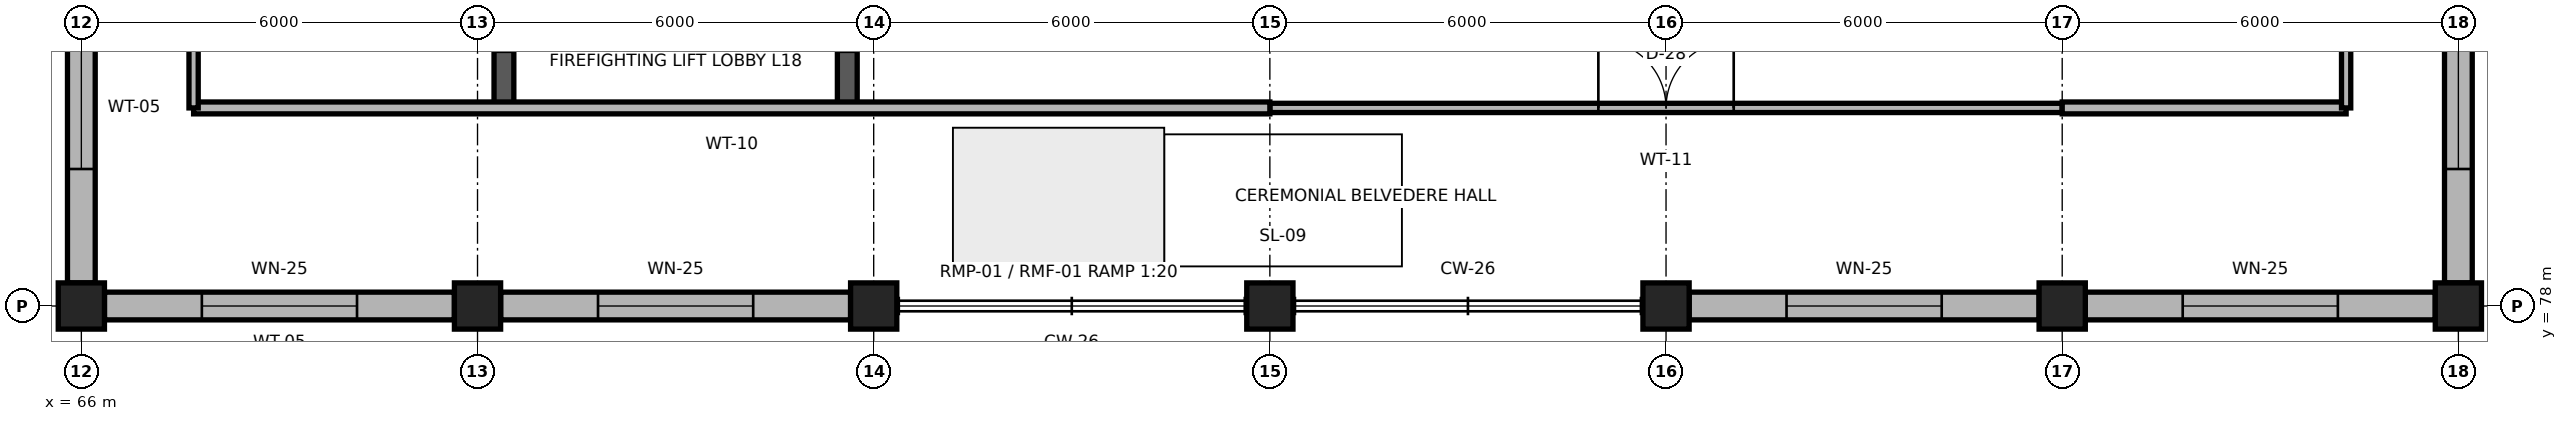
"""IFC4 building model, lengths in metres.
Left out: names, types, materials, properties, quantities, classifications, styles, units other than length and angle.
Written with IfcOpenShell. Run it as: python <this file> out.ifc"""

import sys

from ifc_helpers import new_model, si_unit, direction, frame, frame_2d, origin, origin_2d, place, context, subcontext, project, spatial, rectangle, extrude, element, fill, save


model = new_model("IFC4")
c1 = context("Model", 3, precision=1e-05, world=origin(), true_north=direction((0.0, 1.0)))
c2 = subcontext(c1, "Body", "Model", "MODEL_VIEW")
j1 = project(units=[si_unit("LENGTHUNIT", "METRE"), si_unit("PLANEANGLEUNIT", "RADIAN")], contexts=[c1])
p1 = place(None, origin())
s1 = spatial("IfcSite", under=j1, at=p1, CompositionType="ELEMENT")
p2 = place(p1, origin())
s2 = spatial("IfcBuilding", under=s1, at=p2, CompositionType="ELEMENT")
p3 = place(p2, frame((0.0, 0.0, 72.0)))
s3 = spatial("IfcBuildingStorey", under=s2, at=p3, CompositionType="ELEMENT", Elevation=72.0)
for number, where, z_axis, x_axis in (
    (1, (66.0, 78.0, 0.0), (0.0, 0.0, 1.0), (1.0, 0.0, 0.0)),
    (2, (72.0, 78.0, 0.0), (0.0, 0.0, 1.0), (1.0, 0.0, 0.0)),
    (3, (78.0, 78.0, 0.0), (0.0, 0.0, 1.0), (1.0, 0.0, 0.0)),
    (4, (84.0, 78.0, 0.0), (0.0, 0.0, 1.0), (1.0, 0.0, 0.0)),
    (5, (90.0, 78.0, 0.0), (0.0, 0.0, 1.0), (1.0, 0.0, 0.0)),
    (6, (96.0, 78.0, 0.0), (0.0, 0.0, 1.0), (1.0, 0.0, 0.0)),
    (7, (102.0, 78.0, 0.0), (0.0, 0.0, 1.0), (1.0, 0.0, 0.0)),
):
    element("IfcColumn", number, at=place(p3, frame(where, z_axis=z_axis, x_axis=x_axis)), inside=s3, PredefinedType="COLUMN", context=c2, shape_type="SweptSolid", body=[
        extrude(rectangle(XDim=0.7, YDim=0.7, at=origin_2d()), origin(), (0.0, 0.0, 1.0), 4.3),
    ])
p4 = place(p3, frame((66.35, 78.0, 0.0), z_axis=(0.0, 0.0, 1.0), x_axis=(1.0, 0.0, 0.0)))
e8 = element("IfcWall", 8, at=p4, inside=s3, PredefinedType="SOLIDWALL", context=c2, shape_type="SweptSolid", body=[
    extrude(rectangle(XDim=5.3, YDim=0.42, at=frame_2d((2.65, 0.0))), origin(), (0.0, 0.0, 1.0), 3.88),
])
p5 = place(p4, frame((1.475, 0.0, 0.85)))
e9 = element("IfcOpeningElement", 9, at=p5, cuts=e8, PredefinedType="OPENING", context=c2, shape_type="SweptSolid", body=[
    extrude(rectangle(XDim=2.35, YDim=2.65, at=frame_2d((1.175, 1.325))), frame((0.0, 0.225, 0.0), z_axis=(0.0, -1.0, 0.0), x_axis=(1.0, 0.0, 0.0)), (0.0, 0.0, 1.0), 0.45),
])
p6 = place(p3, frame((72.35, 78.0, 0.0), z_axis=(0.0, 0.0, 1.0), x_axis=(1.0, 0.0, 0.0)))
e10 = element("IfcWall", 10, at=p6, inside=s3, PredefinedType="SOLIDWALL", context=c2, shape_type="SweptSolid", body=[
    extrude(rectangle(XDim=5.3, YDim=0.42, at=frame_2d((2.65, 0.0))), origin(), (0.0, 0.0, 1.0), 3.88),
])
p7 = place(p6, frame((1.475, 0.0, 0.85)))
e11 = element("IfcOpeningElement", 11, at=p7, cuts=e10, PredefinedType="OPENING", context=c2, shape_type="SweptSolid", body=[
    extrude(rectangle(XDim=2.35, YDim=2.65, at=frame_2d((1.175, 1.325))), frame((0.0, 0.225, 0.0), z_axis=(0.0, -1.0, 0.0), x_axis=(1.0, 0.0, 0.0)), (0.0, 0.0, 1.0), 0.45),
])
p8 = place(p3, frame((90.35, 78.0, 0.0), z_axis=(0.0, 0.0, 1.0), x_axis=(1.0, 0.0, 0.0)))
e12 = element("IfcWall", 12, at=p8, inside=s3, PredefinedType="SOLIDWALL", context=c2, shape_type="SweptSolid", body=[
    extrude(rectangle(XDim=5.3, YDim=0.42, at=frame_2d((2.65, 0.0))), origin(), (0.0, 0.0, 1.0), 3.88),
])
p9 = place(p8, frame((1.475, 0.0, 0.85)))
e13 = element("IfcOpeningElement", 13, at=p9, cuts=e12, PredefinedType="OPENING", context=c2, shape_type="SweptSolid", body=[
    extrude(rectangle(XDim=2.35, YDim=2.65, at=frame_2d((1.175, 1.325))), frame((0.0, 0.225, 0.0), z_axis=(0.0, -1.0, 0.0), x_axis=(1.0, 0.0, 0.0)), (0.0, 0.0, 1.0), 0.45),
])
p10 = place(p3, frame((96.35, 78.0, 0.0), z_axis=(0.0, 0.0, 1.0), x_axis=(1.0, 0.0, 0.0)))
e14 = element("IfcWall", 14, at=p10, inside=s3, PredefinedType="SOLIDWALL", context=c2, shape_type="SweptSolid", body=[
    extrude(rectangle(XDim=5.3, YDim=0.42, at=frame_2d((2.65, 0.0))), origin(), (0.0, 0.0, 1.0), 3.88),
])
p11 = place(p10, frame((1.475, 0.0, 0.85)))
e15 = element("IfcOpeningElement", 15, at=p11, cuts=e14, PredefinedType="OPENING", context=c2, shape_type="SweptSolid", body=[
    extrude(rectangle(XDim=2.35, YDim=2.65, at=frame_2d((1.175, 1.325))), frame((0.0, 0.225, 0.0), z_axis=(0.0, -1.0, 0.0), x_axis=(1.0, 0.0, 0.0)), (0.0, 0.0, 1.0), 0.45),
])
p12 = place(p3, frame((66.0, 78.35, 0.0), z_axis=(0.0, 0.0, 1.0), x_axis=(0.0, 1.0, 0.0)))
e16 = element("IfcWall", 16, at=p12, inside=s3, PredefinedType="SOLIDWALL", context=c2, shape_type="SweptSolid", body=[
    extrude(rectangle(XDim=5.3, YDim=0.42, at=frame_2d((2.65, 0.0))), origin(), (0.0, 0.0, 1.0), 3.88),
])
p13 = place(p12, frame((1.725, 0.0, 0.85)))
e17 = element("IfcOpeningElement", 17, at=p13, cuts=e16, PredefinedType="OPENING", context=c2, shape_type="SweptSolid", body=[
    extrude(rectangle(XDim=1.85, YDim=2.55, at=frame_2d((0.925, 1.275))), frame((0.0, 0.225, 0.0), z_axis=(0.0, -1.0, 0.0), x_axis=(1.0, 0.0, 0.0)), (0.0, 0.0, 1.0), 0.45),
])
p14 = place(p3, frame((102.0, 78.35, 0.0), z_axis=(0.0, 0.0, 1.0), x_axis=(0.0, 1.0, 0.0)))
e18 = element("IfcWall", 18, at=p14, inside=s3, PredefinedType="SOLIDWALL", context=c2, shape_type="SweptSolid", body=[
    extrude(rectangle(XDim=5.3, YDim=0.42, at=frame_2d((2.65, 0.0))), origin(), (0.0, 0.0, 1.0), 3.88),
])
p15 = place(p14, frame((1.725, 0.0, 0.85)))
e19 = element("IfcOpeningElement", 19, at=p15, cuts=e18, PredefinedType="OPENING", context=c2, shape_type="SweptSolid", body=[
    extrude(rectangle(XDim=1.85, YDim=2.55, at=frame_2d((0.925, 1.275))), frame((0.0, 0.225, 0.0), z_axis=(0.0, -1.0, 0.0), x_axis=(1.0, 0.0, 0.0)), (0.0, 0.0, 1.0), 0.45),
])
p16 = place(p3, frame((72.4, 81.0, 0.0), z_axis=(0.0, 0.0, 1.0), x_axis=(0.0, 1.0, 0.0)))
e20 = element("IfcWall", 20, at=p16, inside=s3, PredefinedType="SHEAR", context=c2, shape_type="SweptSolid", body=[
    extrude(rectangle(XDim=3.0, YDim=0.3, at=frame_2d((1.5, 0.0))), origin(), (0.0, 0.0, 1.0), 4.3),
])
p17 = place(p16, frame((0.85, 0.0, 0.0)))
e21 = element("IfcOpeningElement", 21, at=p17, cuts=e20, PredefinedType="OPENING", context=c2, shape_type="SweptSolid", body=[
    extrude(rectangle(XDim=1.3, YDim=2.2, at=frame_2d((0.65, 1.1))), frame((0.0, 0.165, 0.0), z_axis=(0.0, -1.0, 0.0), x_axis=(1.0, 0.0, 0.0)), (0.0, 0.0, 1.0), 0.33),
])
p18 = place(p3, frame((77.6, 81.0, 0.0), z_axis=(0.0, 0.0, 1.0), x_axis=(0.0, 1.0, 0.0)))
e22 = element("IfcWall", 22, at=p18, inside=s3, PredefinedType="SHEAR", context=c2, shape_type="SweptSolid", body=[
    extrude(rectangle(XDim=3.0, YDim=0.3, at=frame_2d((1.5, 0.0))), origin(), (0.0, 0.0, 1.0), 4.3),
])
p19 = place(p18, frame((0.85, 0.0, 0.0)))
e23 = element("IfcOpeningElement", 23, at=p19, cuts=e22, PredefinedType="OPENING", context=c2, shape_type="SweptSolid", body=[
    extrude(rectangle(XDim=1.3, YDim=2.2, at=frame_2d((0.65, 1.1))), frame((0.0, 0.165, 0.0), z_axis=(0.0, -1.0, 0.0), x_axis=(1.0, 0.0, 0.0)), (0.0, 0.0, 1.0), 0.33),
])
p20 = place(p3, frame((84.0, 81.0, 0.0), z_axis=(0.0, 0.0, 1.0), x_axis=(1.0, 0.0, 0.0)))
e24 = element("IfcWall", 24, at=p20, inside=s3, PredefinedType="PARTITIONING", context=c2, shape_type="SweptSolid", body=[
    extrude(rectangle(XDim=12.0, YDim=0.14, at=frame_2d((6.0, 0.0))), origin(), (0.0, 0.0, 1.0), 4.3),
])
p21 = place(p20, frame((4.975, 0.0, 0.0)))
e25 = element("IfcOpeningElement", 25, at=p21, cuts=e24, PredefinedType="OPENING", context=c2, shape_type="SweptSolid", body=[
    extrude(rectangle(XDim=2.05, YDim=2.85, at=frame_2d((1.025, 1.425))), frame((0.0, 0.085, 0.0), z_axis=(0.0, -1.0, 0.0), x_axis=(1.0, 0.0, 0.0)), (0.0, 0.0, 1.0), 0.17),
])
p22 = place(p3, frame((67.7, 81.0, 0.0), z_axis=(0.0, 0.0, 1.0), x_axis=(1.0, 0.0, 0.0)))
e26 = element("IfcWall", 26, at=p22, inside=s3, PredefinedType="PARTITIONING", context=c2, shape_type="SweptSolid", body=[
    extrude(rectangle(XDim=16.3, YDim=0.18, at=frame_2d((8.15, 0.0))), origin(), (0.0, 0.0, 1.0), 4.3),
])
p23 = place(p3, frame((96.0, 81.0, 0.0), z_axis=(0.0, 0.0, 1.0), x_axis=(1.0, 0.0, 0.0)))
e27 = element("IfcWall", 27, at=p23, inside=s3, PredefinedType="PARTITIONING", context=c2, shape_type="SweptSolid", body=[
    extrude(rectangle(XDim=4.3, YDim=0.18, at=frame_2d((2.15, 0.0))), origin(), (0.0, 0.0, 1.0), 4.3),
])
for number, where, z_axis, x_axis in (
    (28, (67.7, 81.0, 0.0), (0.0, 0.0, 1.0), (0.0, 1.0, 0.0)),
    (29, (100.3, 81.0, 0.0), (0.0, 0.0, 1.0), (0.0, 1.0, 0.0)),
):
    element("IfcWall", number, at=place(p3, frame(where, z_axis=z_axis, x_axis=x_axis)), inside=s3, PredefinedType="PARTITIONING", context=c2, shape_type="SweptSolid", body=[
        extrude(rectangle(XDim=1.15, YDim=0.14, at=frame_2d((0.575, 0.0))), origin(), (0.0, 0.0, 1.0), 4.3),
    ])
p24 = place(p5, origin())
e30 = element("IfcWindow", 30, at=p24, inside=s3, PartitioningType="SINGLE_PANEL", PredefinedType="WINDOW", context=c2, shape_type="SweptSolid", body=[
    extrude(rectangle(XDim=2.35, YDim=2.65, at=frame_2d((1.175, 1.325))), frame((0.0, 0.03, 0.0), z_axis=(0.0, -1.0, 0.0), x_axis=(1.0, 0.0, 0.0)), (0.0, 0.0, 1.0), 0.06),
])
fill(e9, e30)
p25 = place(p7, origin())
e31 = element("IfcWindow", 31, at=p25, inside=s3, PartitioningType="SINGLE_PANEL", PredefinedType="WINDOW", context=c2, shape_type="SweptSolid", body=[
    extrude(rectangle(XDim=2.35, YDim=2.65, at=frame_2d((1.175, 1.325))), frame((0.0, 0.03, 0.0), z_axis=(0.0, -1.0, 0.0), x_axis=(1.0, 0.0, 0.0)), (0.0, 0.0, 1.0), 0.06),
])
fill(e11, e31)
p26 = place(p9, origin())
e32 = element("IfcWindow", 32, at=p26, inside=s3, PartitioningType="SINGLE_PANEL", PredefinedType="WINDOW", context=c2, shape_type="SweptSolid", body=[
    extrude(rectangle(XDim=2.35, YDim=2.65, at=frame_2d((1.175, 1.325))), frame((0.0, 0.03, 0.0), z_axis=(0.0, -1.0, 0.0), x_axis=(1.0, 0.0, 0.0)), (0.0, 0.0, 1.0), 0.06),
])
fill(e13, e32)
p27 = place(p11, origin())
e33 = element("IfcWindow", 33, at=p27, inside=s3, PartitioningType="SINGLE_PANEL", PredefinedType="WINDOW", context=c2, shape_type="SweptSolid", body=[
    extrude(rectangle(XDim=2.35, YDim=2.65, at=frame_2d((1.175, 1.325))), frame((0.0, 0.03, 0.0), z_axis=(0.0, -1.0, 0.0), x_axis=(1.0, 0.0, 0.0)), (0.0, 0.0, 1.0), 0.06),
])
fill(e15, e33)
p28 = place(p13, origin())
e34 = element("IfcWindow", 34, at=p28, inside=s3, PartitioningType="SINGLE_PANEL", PredefinedType="WINDOW", context=c2, shape_type="SweptSolid", body=[
    extrude(rectangle(XDim=1.85, YDim=2.55, at=frame_2d((0.925, 1.275))), frame((0.0, 0.03, 0.0), z_axis=(0.0, -1.0, 0.0), x_axis=(1.0, 0.0, 0.0)), (0.0, 0.0, 1.0), 0.06),
])
fill(e17, e34)
p29 = place(p15, origin())
e35 = element("IfcWindow", 35, at=p29, inside=s3, PartitioningType="SINGLE_PANEL", PredefinedType="WINDOW", context=c2, shape_type="SweptSolid", body=[
    extrude(rectangle(XDim=1.85, YDim=2.55, at=frame_2d((0.925, 1.275))), frame((0.0, 0.03, 0.0), z_axis=(0.0, -1.0, 0.0), x_axis=(1.0, 0.0, 0.0)), (0.0, 0.0, 1.0), 0.06),
])
fill(e19, e35)
p30 = place(p21, origin())
e36 = element("IfcDoor", 36, at=p30, inside=s3, OperationType="DOUBLE_DOOR_SINGLE_SWING", PredefinedType="DOOR", context=c2, shape_type="SweptSolid", body=[
    extrude(rectangle(XDim=2.05, YDim=2.85, at=frame_2d((1.025, 1.425))), frame((0.0, 0.025, 0.0), z_axis=(0.0, -1.0, 0.0), x_axis=(1.0, 0.0, 0.0)), (0.0, 0.0, 1.0), 0.05),
])
fill(e25, e36)
save(model, sys.argv[1])
